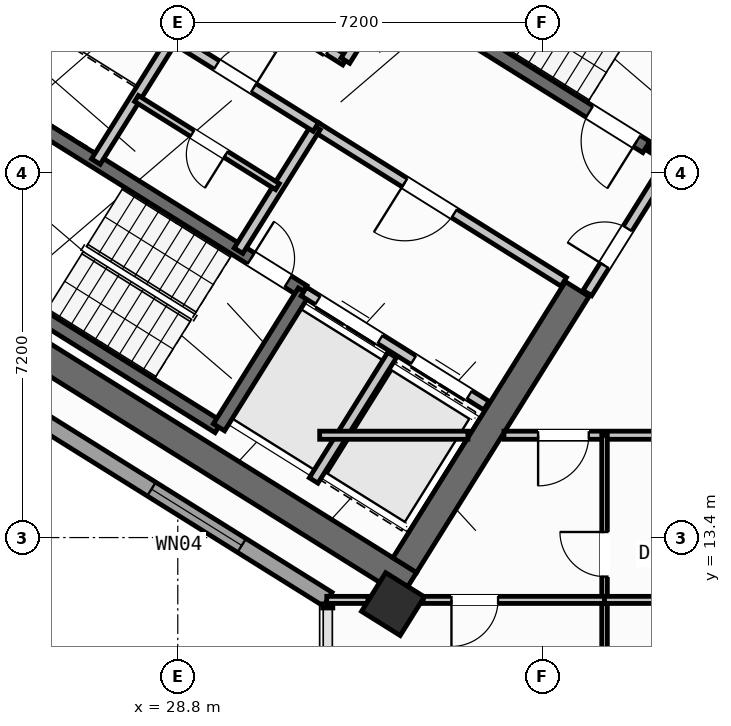
"""IFC4 building model, lengths in metres.
Left out: names, types, materials, properties, quantities, classifications, styles, units other than length and angle.
Written with IfcOpenShell. Run it as: python <this file> out.ifc"""

import sys

from ifc_helpers import new_model, si_unit, direction, frame, frame_2d, origin, origin_2d, place, context, subcontext, project, spatial, rectangle, hollow_rectangle, extrude, source, transform, mapped, element, fill, save


model = new_model("IFC4")
c1 = context("Model", 3, precision=1e-05, world=origin(), true_north=direction((0.0, 1.0)))
c2 = subcontext(c1, "Body", "Model", "MODEL_VIEW")
j1 = project(units=[si_unit("LENGTHUNIT", "METRE"), si_unit("PLANEANGLEUNIT", "RADIAN")], contexts=[c1])
p1 = place(None, origin())
s1 = spatial("IfcSite", under=j1, at=p1, CompositionType="ELEMENT")
p2 = place(p1, origin())
s2 = spatial("IfcBuilding", under=s1, at=p2, CompositionType="ELEMENT")
p3 = place(p2, frame((0.0, 0.0, 105.3)))
s3 = spatial("IfcBuildingStorey", under=s2, at=p3, CompositionType="ELEMENT", Elevation=105.3)
p4 = place(p3, frame((33.366, 12.477, 0.0), z_axis=(0.0, 0.0, 1.0), x_axis=(-0.848047359947, 0.529920442413, 0.0)))
e1 = element("IfcWall", 1, at=p4, inside=s3, PredefinedType="SHEAR", context=c2, shape_type="SweptSolid", body=[
    extrude(rectangle(XDim=13.14, YDim=0.55, at=frame_2d((6.57, 0.0))), origin(), (0.0, 0.0, 1.0), 3.35),
])
p5 = place(p3, frame((40.194, 23.922, 0.0), z_axis=(0.0, 0.0, 1.0), x_axis=(-0.529888438328, -0.848067357541, 0.0)))
e2 = element("IfcWall", 2, at=p5, inside=s3, PredefinedType="SHEAR", context=c2, shape_type="SweptSolid", body=[
    extrude(rectangle(XDim=3.575, YDim=0.55, at=frame_2d((1.788, 0.0))), origin(), (0.0, 0.0, 1.0), 3.35),
])
p6 = place(p3, frame((36.683, 18.304, 0.0), z_axis=(0.0, 0.0, 1.0), x_axis=(-0.529896466841, -0.848062341122, 0.0)))
e3 = element("IfcWall", 3, at=p6, inside=s3, PredefinedType="SHEAR", context=c2, shape_type="SweptSolid", body=[
    extrude(rectangle(XDim=6.425, YDim=0.55, at=frame_2d((3.212, 0.0))), origin(), (0.0, 0.0, 1.0), 3.35),
])
m1 = source(origin(), c2, "Body", "SweptSolid", [
    extrude(hollow_rectangle(XDim=0.9, YDim=0.9, WallThickness=0.036, at=origin_2d()), origin(), (0.0, 0.0, 1.0), 3.6),
])
p7 = place(p3, frame((33.046, 12.087, 0.0), z_axis=(0.0, 0.0, 1.0), x_axis=(-0.848048096156, 0.529919264233, 0.0)))
e4 = element("IfcColumn", 4, at=p7, inside=s3, PredefinedType="COLUMN", context=c2, shape_type="MappedRepresentation", body=[
    mapped(m1, transform((0.0, 0.0, 0.0), scale=1.0)),
])
p8 = place(p3, frame((31.76, 12.183, 0.0), z_axis=(0.0, 0.0, 1.0), x_axis=(-0.848047074256, 0.529920899612, 0.0)))
e5 = element("IfcWall", 5, at=p8, inside=s3, PredefinedType="STANDARD", context=c2, shape_type="SweptSolid", body=[
    extrude(rectangle(XDim=30.652, YDim=0.32, at=frame_2d((15.326, 0.0))), origin(), (0.0, 0.0, 1.0), 3.35),
])
p9 = place(p8, frame((15.153, 0.0, 0.0)))
e6 = element("IfcOpeningElement", 6, at=p9, cuts=e5, PredefinedType="OPENING", context=c2, shape_type="SweptSolid", body=[
    extrude(rectangle(XDim=1.2, YDim=2.15, at=frame_2d((0.6, 1.075))), frame((0.0, 0.17, 0.0), z_axis=(0.0, -1.0, 0.0), x_axis=(1.0, 0.0, 0.0)), (0.0, 0.0, 1.0), 0.34),
])
p10 = place(p8, frame((2.002, 0.0, 0.8)))
e7 = element("IfcOpeningElement", 7, at=p10, cuts=e5, PredefinedType="OPENING", context=c2, shape_type="SweptSolid", body=[
    extrude(rectangle(XDim=2.1, YDim=1.55, at=frame_2d((1.05, 0.775))), frame((0.0, 0.17, 0.0), z_axis=(0.0, -1.0, 0.0), x_axis=(1.0, 0.0, 0.0)), (0.0, 0.0, 1.0), 0.34),
])
p11 = place(p8, frame((7.206, 0.0, 0.8)))
e8 = element("IfcOpeningElement", 8, at=p11, cuts=e5, PredefinedType="OPENING", context=c2, shape_type="SweptSolid", body=[
    extrude(rectangle(XDim=2.1, YDim=1.55, at=frame_2d((1.05, 0.775))), frame((0.0, 0.17, 0.0), z_axis=(0.0, -1.0, 0.0), x_axis=(1.0, 0.0, 0.0)), (0.0, 0.0, 1.0), 0.34),
])
p12 = place(p8, frame((12.648, 0.0, 1.0)))
e9 = element("IfcOpeningElement", 9, at=p12, cuts=e5, PredefinedType="OPENING", context=c2, shape_type="SweptSolid", body=[
    extrude(rectangle(XDim=0.9, YDim=1.25, at=frame_2d((0.45, 0.625))), frame((0.0, 0.17, 0.0), z_axis=(0.0, -1.0, 0.0), x_axis=(1.0, 0.0, 0.0)), (0.0, 0.0, 1.0), 0.34),
])
p13 = place(p8, frame((20.628, 0.0, 0.95)))
e10 = element("IfcOpeningElement", 10, at=p13, cuts=e5, PredefinedType="OPENING", context=c2, shape_type="SweptSolid", body=[
    extrude(rectangle(XDim=1.2, YDim=1.4, at=frame_2d((0.6, 0.7))), frame((0.0, 0.17, 0.0), z_axis=(0.0, -1.0, 0.0), x_axis=(1.0, 0.0, 0.0)), (0.0, 0.0, 1.0), 0.34),
])
p14 = place(p8, frame((26.008, 0.0, 1.0)))
e11 = element("IfcOpeningElement", 11, at=p14, cuts=e5, PredefinedType="OPENING", context=c2, shape_type="SweptSolid", body=[
    extrude(rectangle(XDim=0.9, YDim=1.25, at=frame_2d((0.45, 0.625))), frame((0.0, 0.17, 0.0), z_axis=(0.0, -1.0, 0.0), x_axis=(1.0, 0.0, 0.0)), (0.0, 0.0, 1.0), 0.34),
])
p15 = place(p8, frame((28.408, 0.0, 1.0)))
e12 = element("IfcOpeningElement", 12, at=p15, cuts=e5, PredefinedType="OPENING", context=c2, shape_type="SweptSolid", body=[
    extrude(rectangle(XDim=0.9, YDim=1.25, at=frame_2d((0.45, 0.625))), frame((0.0, 0.17, 0.0), z_axis=(0.0, -1.0, 0.0), x_axis=(1.0, 0.0, 0.0)), (0.0, 0.0, 1.0), 0.34),
])
p16 = place(p3, frame((29.605, 15.581, 0.0), z_axis=(0.0, 0.0, 1.0), x_axis=(-0.848036911448, 0.529937163087, 0.0)))
e13 = element("IfcWall", 13, at=p16, inside=s3, PredefinedType="SHEAR", context=c2, shape_type="SweptSolid", body=[
    extrude(rectangle(XDim=7.46, YDim=0.26, at=frame_2d((3.73, 0.0))), origin(), (0.0, 0.0, 1.0), 3.35),
])
p17 = place(p3, frame((31.28, 18.261, 0.0), z_axis=(0.0, 0.0, 1.0), x_axis=(-0.848051618787, 0.529913626805, 0.0)))
e14 = element("IfcWall", 14, at=p17, inside=s3, PredefinedType="SHEAR", context=c2, shape_type="SweptSolid", body=[
    extrude(rectangle(XDim=7.46, YDim=0.26, at=frame_2d((3.73, 0.0))), origin(), (0.0, 0.0, 1.0), 3.35),
])
p18 = place(p17, frame((0.36, 0.0, 0.0)))
e15 = element("IfcOpeningElement", 15, at=p18, cuts=e14, PredefinedType="OPENING", context=c2, shape_type="SweptSolid", body=[
    extrude(rectangle(XDim=0.86, YDim=2.05, at=frame_2d((0.43, 1.025))), frame((0.0, 0.14, 0.0), z_axis=(0.0, -1.0, 0.0), x_axis=(1.0, 0.0, 0.0)), (0.0, 0.0, 1.0), 0.28),
])
p19 = place(p3, frame((31.288, 18.256, 0.0), z_axis=(0.0, 0.0, 1.0), x_axis=(-0.529943379326, -0.848033026897, 0.0)))
e16 = element("IfcWall", 16, at=p19, inside=s3, PredefinedType="SHEAR", context=c2, shape_type="SweptSolid", body=[
    extrude(rectangle(XDim=3.16, YDim=0.26, at=frame_2d((1.58, 0.0))), origin(), (0.0, 0.0, 1.0), 3.35),
])
p20 = place(p3, frame((38.046, 21.108, 0.0), z_axis=(0.0, 0.0, 1.0), x_axis=(-0.848054434086, 0.529909121291, 0.0)))
e17 = element("IfcWall", 17, at=p20, inside=s3, PredefinedType="SHEAR", context=c2, shape_type="SweptSolid", body=[
    extrude(rectangle(XDim=7.33, YDim=0.26, at=frame_2d((3.665, 0.0))), origin(), (0.0, 0.0, 1.0), 3.35),
])
p21 = place(p20, frame((0.22, 0.0, 0.0)))
e18 = element("IfcOpeningElement", 18, at=p21, cuts=e17, PredefinedType="OPENING", context=c2, shape_type="SweptSolid", body=[
    extrude(rectangle(XDim=1.1, YDim=2.1, at=frame_2d((0.55, 1.05))), frame((0.0, 0.14, 0.0), z_axis=(0.0, -1.0, 0.0), x_axis=(1.0, 0.0, 0.0)), (0.0, 0.0, 1.0), 0.28),
])
p22 = place(p3, frame((34.891, 16.005, 0.0), z_axis=(0.0, 0.0, 1.0), x_axis=(-0.848062873452, 0.529895614884, 0.0)))
e19 = element("IfcWall", 19, at=p22, inside=s3, PredefinedType="STANDARD", context=c2, shape_type="SweptSolid", body=[
    extrude(rectangle(XDim=4.248, YDim=0.2, at=frame_2d((2.124, 0.0))), origin(), (0.0, 0.0, 1.0), 3.34),
])
p23 = place(p22, frame((0.398, 0.0, 0.0)))
e20 = element("IfcOpeningElement", 20, at=p23, cuts=e19, PredefinedType="OPENING", context=c2, shape_type="SweptSolid", body=[
    extrude(rectangle(XDim=1.3, YDim=2.2, at=frame_2d((0.65, 1.1))), frame((0.0, 0.11, 0.0), z_axis=(0.0, -1.0, 0.0), x_axis=(1.0, 0.0, 0.0)), (0.0, 0.0, 1.0), 0.22),
])
p24 = place(p22, frame((2.473, 0.0, 0.0)))
e21 = element("IfcOpeningElement", 21, at=p24, cuts=e19, PredefinedType="OPENING", context=c2, shape_type="SweptSolid", body=[
    extrude(rectangle(XDim=1.45, YDim=2.25, at=frame_2d((0.725, 1.125))), frame((0.0, 0.11, 0.0), z_axis=(0.0, -1.0, 0.0), x_axis=(1.0, 0.0, 0.0)), (0.0, 0.0, 1.0), 0.22),
])
p25 = place(p3, frame((36.417, 18.447, 0.0), z_axis=(0.0, 0.0, 1.0), x_axis=(-0.848064879198, 0.529892404805, 0.0)))
e22 = element("IfcWall", 22, at=p25, inside=s3, PredefinedType="STANDARD", context=c2, shape_type="SweptSolid", body=[
    extrude(rectangle(XDim=5.768, YDim=0.2, at=frame_2d((2.884, 0.0))), origin(), (0.0, 0.0, 1.0), 3.34),
])
p26 = place(p25, frame((2.548, 0.0, 0.0)))
e23 = element("IfcOpeningElement", 23, at=p26, cuts=e22, PredefinedType="OPENING", context=c2, shape_type="SweptSolid", body=[
    extrude(rectangle(XDim=1.15, YDim=2.1, at=frame_2d((0.575, 1.05))), frame((0.0, 0.11, 0.0), z_axis=(0.0, -1.0, 0.0), x_axis=(1.0, 0.0, 0.0)), (0.0, 0.0, 1.0), 0.22),
])
p27 = place(p3, frame((32.108, 22.814, 0.0), z_axis=(0.0, 0.0, 1.0), x_axis=(-0.848042229521, 0.529928652696, 0.0)))
e24 = element("IfcWall", 24, at=p27, inside=s3, PredefinedType="STANDARD", context=c2, shape_type="SweptSolid", body=[
    extrude(rectangle(XDim=5.62, YDim=0.2, at=frame_2d((2.81, 0.0))), origin(), (0.0, 0.0, 1.0), 3.34),
])
p28 = place(p27, frame((0.39, 0.0, 0.0)))
e25 = element("IfcOpeningElement", 25, at=p28, cuts=e24, PredefinedType="OPENING", context=c2, shape_type="SweptSolid", body=[
    extrude(rectangle(XDim=1.1, YDim=2.15, at=frame_2d((0.55, 1.075))), frame((0.0, 0.11, 0.0), z_axis=(0.0, -1.0, 0.0), x_axis=(1.0, 0.0, 0.0)), (0.0, 0.0, 1.0), 0.22),
])
p29 = place(p27, frame((2.25, 0.0, 0.0)))
e26 = element("IfcOpeningElement", 26, at=p29, cuts=e24, PredefinedType="OPENING", context=c2, shape_type="SweptSolid", body=[
    extrude(rectangle(XDim=1.1, YDim=2.15, at=frame_2d((0.55, 1.075))), frame((0.0, 0.11, 0.0), z_axis=(0.0, -1.0, 0.0), x_axis=(1.0, 0.0, 0.0)), (0.0, 0.0, 1.0), 0.22),
])
p30 = place(p27, frame((4.11, 0.0, 0.0)))
e27 = element("IfcOpeningElement", 27, at=p30, cuts=e24, PredefinedType="OPENING", context=c2, shape_type="SweptSolid", body=[
    extrude(rectangle(XDim=1.1, YDim=2.15, at=frame_2d((0.55, 1.075))), frame((0.0, 0.11, 0.0), z_axis=(0.0, -1.0, 0.0), x_axis=(1.0, 0.0, 0.0)), (0.0, 0.0, 1.0), 0.22),
])
p31 = place(p3, frame((32.982, 24.213, 0.0), z_axis=(0.0, 0.0, 1.0), x_axis=(-0.529839334948, -0.84809803628, 0.0)))
e28 = element("IfcWall", 28, at=p31, inside=s3, PredefinedType="STANDARD", context=c2, shape_type="SweptSolid", body=[
    extrude(rectangle(XDim=1.65, YDim=0.2, at=frame_2d((0.825, 0.0))), origin(), (0.0, 0.0, 1.0), 3.34),
])
p32 = place(p3, frame((33.029, 17.003, 0.0), z_axis=(0.0, 0.0, 1.0), x_axis=(-0.529916267533, -0.848049968695, 0.0)))
e29 = element("IfcWall", 29, at=p32, inside=s3, PredefinedType="STANDARD", context=c2, shape_type="SweptSolid", body=[
    extrude(rectangle(XDim=2.92, YDim=0.2, at=frame_2d((1.46, 0.0))), origin(), (0.0, 0.0, 1.0), 3.34),
])
for number, where, z_axis, x_axis in (
    (30, (31.525, 21.504, 0.0), (0.0, 0.0, 1.0), (-0.53, -0.848, 0.0)),
    (31, (28.71, 23.263, 0.0), (0.0, 0.0, 1.0), (-0.53, -0.848, 0.0)),
):
    element("IfcWall", number, at=place(p3, frame(where, z_axis=z_axis, x_axis=x_axis)), inside=s3, PredefinedType="STANDARD", context=c2, shape_type="SweptSolid", body=[
        extrude(rectangle(XDim=2.88, YDim=0.2, at=frame_2d((1.44, 0.0))), origin(), (0.0, 0.0, 1.0), 3.34),
    ])
p33 = place(p3, frame((31.525, 21.504, 0.0), z_axis=(0.0, 0.0, 1.0), x_axis=(-0.848040211232, 0.529931882541, 0.0)))
e32 = element("IfcWall", 32, at=p33, inside=s3, PredefinedType="STANDARD", context=c2, shape_type="SweptSolid", body=[
    extrude(rectangle(XDim=6.218, YDim=0.2, at=frame_2d((3.109, 0.0))), origin(), (0.0, 0.0, 1.0), 3.34),
])
p34 = place(p33, frame((4.4, 0.0, 0.0)))
e33 = element("IfcOpeningElement", 33, at=p34, cuts=e32, PredefinedType="OPENING", context=c2, shape_type="SweptSolid", body=[
    extrude(rectangle(XDim=0.86, YDim=2.05, at=frame_2d((0.43, 1.025))), frame((0.0, 0.11, 0.0), z_axis=(0.0, -1.0, 0.0), x_axis=(1.0, 0.0, 0.0)), (0.0, 0.0, 1.0), 0.22),
])
p35 = place(p33, frame((1.45, 0.0, 0.0)))
e34 = element("IfcOpeningElement", 34, at=p35, cuts=e32, PredefinedType="OPENING", context=c2, shape_type="SweptSolid", body=[
    extrude(rectangle(XDim=0.86, YDim=2.05, at=frame_2d((0.43, 1.025))), frame((0.0, 0.11, 0.0), z_axis=(0.0, -1.0, 0.0), x_axis=(1.0, 0.0, 0.0)), (0.0, 0.0, 1.0), 0.22),
])
p36 = place(p3, frame((30.766, 20.327, 0.0), z_axis=(0.0, 0.0, 1.0), x_axis=(-0.848052663127, 0.529911955482, 0.0)))
e35 = element("IfcWall", 35, at=p36, inside=s3, PredefinedType="PLUMBINGWALL", context=c2, shape_type="SweptSolid", body=[
    extrude(rectangle(XDim=3.28, YDim=0.14, at=frame_2d((1.64, 0.0))), origin(), (0.0, 0.0, 1.0), 3.34),
])
p37 = place(p36, frame((1.2, 0.0, 0.0)))
e36 = element("IfcOpeningElement", 36, at=p37, cuts=e35, PredefinedType="OPENING", context=c2, shape_type="SweptSolid", body=[
    extrude(rectangle(XDim=0.78, YDim=2.05, at=frame_2d((0.39, 1.025))), frame((0.0, 0.08, 0.0), z_axis=(0.0, -1.0, 0.0), x_axis=(1.0, 0.0, 0.0)), (0.0, 0.0, 1.0), 0.16),
])
p38 = place(p3, frame((38.451, 20.737, 0.0), z_axis=(0.0, 0.0, 1.0), x_axis=(-0.529924799939, -0.848044637038, 0.0)))
e37 = element("IfcWall", 37, at=p38, inside=s3, PredefinedType="STANDARD", context=c2, shape_type="SweptSolid", body=[
    extrude(rectangle(XDim=2.96, YDim=0.2, at=frame_2d((1.48, 0.0))), origin(), (0.0, 0.0, 1.0), 3.34),
])
p39 = place(p38, frame((1.46, 0.0, 0.0)))
e38 = element("IfcOpeningElement", 38, at=p39, cuts=e37, PredefinedType="OPENING", context=c2, shape_type="SweptSolid", body=[
    extrude(rectangle(XDim=0.86, YDim=2.05, at=frame_2d((0.43, 1.025))), frame((0.0, 0.11, 0.0), z_axis=(0.0, -1.0, 0.0), x_axis=(1.0, 0.0, 0.0)), (0.0, 0.0, 1.0), 0.22),
])
p40 = place(p3, frame((31.6, 15.42, 0.0), z_axis=(0.0, 0.0, 1.0), x_axis=(1.0, 0.0, 0.0)))
e39 = element("IfcWall", 39, at=p40, inside=s3, PredefinedType="PARTITIONING", context=c2, shape_type="SweptSolid", body=[
    extrude(rectangle(XDim=2.925, YDim=0.16, at=frame_2d((1.462, 0.0))), origin(), (0.0, 0.0, 1.0), 3.34),
])
p41 = place(p3, frame((35.237, 15.42, 0.0), z_axis=(0.0, 0.0, 1.0), x_axis=(1.0, 0.0, 0.0)))
e40 = element("IfcWall", 40, at=p41, inside=s3, PredefinedType="PARTITIONING", context=c2, shape_type="SweptSolid", body=[
    extrude(rectangle(XDim=15.432, YDim=0.16, at=frame_2d((7.716, 0.0))), origin(), (0.0, 0.0, 1.0), 3.34),
])
p42 = place(p41, frame((0.674, 0.0, 0.0)))
e41 = element("IfcOpeningElement", 41, at=p42, cuts=e40, PredefinedType="OPENING", context=c2, shape_type="SweptSolid", body=[
    extrude(rectangle(XDim=1.0, YDim=2.1, at=frame_2d((0.5, 1.05))), frame((0.0, 0.09, 0.0), z_axis=(0.0, -1.0, 0.0), x_axis=(1.0, 0.0, 0.0)), (0.0, 0.0, 1.0), 0.18),
])
p43 = place(p41, frame((9.094, 0.0, 0.0)))
e42 = element("IfcOpeningElement", 42, at=p43, cuts=e40, PredefinedType="OPENING", context=c2, shape_type="SweptSolid", body=[
    extrude(rectangle(XDim=1.0, YDim=2.1, at=frame_2d((0.5, 1.05))), frame((0.0, 0.09, 0.0), z_axis=(0.0, -1.0, 0.0), x_axis=(1.0, 0.0, 0.0)), (0.0, 0.0, 1.0), 0.18),
])
p44 = place(p3, frame((37.222, 1.96, 0.0), z_axis=(0.0, 0.0, 1.0), x_axis=(0.0, 1.0, 0.0)))
e43 = element("IfcWall", 43, at=p44, inside=s3, PredefinedType="PARTITIONING", context=c2, shape_type="SweptSolid", body=[
    extrude(rectangle(XDim=13.46, YDim=0.11, at=frame_2d((6.73, 0.0))), origin(), (0.0, 0.0, 1.0), 3.34),
])
p45 = place(p44, frame((5.2, 0.0, 0.0)))
e44 = element("IfcOpeningElement", 44, at=p45, cuts=e43, PredefinedType="OPENING", context=c2, shape_type="SweptSolid", body=[
    extrude(rectangle(XDim=0.92, YDim=2.08, at=frame_2d((0.46, 1.04))), frame((0.0, 0.065, 0.0), z_axis=(0.0, -1.0, 0.0), x_axis=(1.0, 0.0, 0.0)), (0.0, 0.0, 1.0), 0.13),
])
p46 = place(p44, frame((10.67, 0.0, 0.0)))
e45 = element("IfcOpeningElement", 45, at=p46, cuts=e43, PredefinedType="OPENING", context=c2, shape_type="SweptSolid", body=[
    extrude(rectangle(XDim=0.88, YDim=2.08, at=frame_2d((0.44, 1.04))), frame((0.0, 0.065, 0.0), z_axis=(0.0, -1.0, 0.0), x_axis=(1.0, 0.0, 0.0)), (0.0, 0.0, 1.0), 0.13),
])
p47 = place(p3, frame((31.74, 12.17, 0.0), z_axis=(0.0, 0.0, 1.0), x_axis=(1.0, 0.0, 0.0)))
e46 = element("IfcWall", 46, at=p47, inside=s3, PredefinedType="PLUMBINGWALL", context=c2, shape_type="SweptSolid", body=[
    extrude(rectangle(XDim=0.813, YDim=0.14, at=frame_2d((0.407, 0.0))), origin(), (0.0, 0.0, 1.0), 3.34),
])
p48 = place(p3, frame((33.643, 12.17, 0.0), z_axis=(0.0, 0.0, 1.0), x_axis=(1.0, 0.0, 0.0)))
e47 = element("IfcWall", 47, at=p48, inside=s3, PredefinedType="PLUMBINGWALL", context=c2, shape_type="SweptSolid", body=[
    extrude(rectangle(XDim=3.579, YDim=0.14, at=frame_2d((1.79, 0.0))), origin(), (0.0, 0.0, 1.0), 2.525),
])
p49 = place(p48, frame((0.558, 0.0, 0.0)))
e48 = element("IfcOpeningElement", 48, at=p49, cuts=e47, PredefinedType="OPENING", context=c2, shape_type="SweptSolid", body=[
    extrude(rectangle(XDim=0.92, YDim=2.08, at=frame_2d((0.46, 1.04))), frame((0.0, 0.08, 0.0), z_axis=(0.0, -1.0, 0.0), x_axis=(1.0, 0.0, 0.0)), (0.0, 0.0, 1.0), 0.16),
])
p50 = place(p3, frame((37.222, 12.17, 0.0), z_axis=(0.0, 0.0, 1.0), x_axis=(1.0, 0.0, 0.0)))
e49 = element("IfcWall", 49, at=p50, inside=s3, PredefinedType="PLUMBINGWALL", context=c2, shape_type="SweptSolid", body=[
    extrude(rectangle(XDim=4.728, YDim=0.14, at=frame_2d((2.364, 0.0))), origin(), (0.0, 0.0, 1.0), 2.525),
])
m2 = source(origin(), c2, "Body", "SweptSolid", [
    extrude(rectangle(XDim=2.1, YDim=1.55, at=frame_2d((1.05, 0.775))), frame((0.0, 0.03, 0.0), z_axis=(0.0, -1.0, 0.0), x_axis=(1.0, 0.0, 0.0)), (0.0, 0.0, 1.0), 0.06),
])
p51 = place(p10, origin())
e50 = element("IfcWindow", 50, at=p51, inside=s3, PartitioningType="SINGLE_PANEL", PredefinedType="WINDOW", context=c2, shape_type="MappedRepresentation", body=[
    mapped(m2, transform((0.0, 0.0, 0.0), scale=1.0)),
])
fill(e7, e50)
m3 = source(origin(), c2, "Body", "SweptSolid", [
    extrude(rectangle(XDim=0.86, YDim=2.05, at=frame_2d((0.43, 1.025))), frame((0.0, 0.025, 0.0), z_axis=(0.0, -1.0, 0.0), x_axis=(1.0, 0.0, 0.0)), (0.0, 0.0, 1.0), 0.05),
])
p52 = place(p18, frame((0.86, 0.0, 0.0), z_axis=(0.0, 0.0, 1.0), x_axis=(-1.0, 0.0, 0.0)))
e51 = element("IfcDoor", 51, at=p52, inside=s3, OperationType="SINGLE_SWING_LEFT", PredefinedType="DOOR", context=c2, shape_type="MappedRepresentation", body=[
    mapped(m3, transform((0.0, 0.0, 0.0), scale=1.0)),
])
fill(e15, e51)
m4 = source(origin(), c2, "Body", "SweptSolid", [
    extrude(rectangle(XDim=1.1, YDim=2.1, at=frame_2d((0.55, 1.05))), frame((0.0, 0.025, 0.0), z_axis=(0.0, -1.0, 0.0), x_axis=(1.0, 0.0, 0.0)), (0.0, 0.0, 1.0), 0.05),
])
p53 = place(p21, origin())
e52 = element("IfcDoor", 52, at=p53, inside=s3, OperationType="SINGLE_SWING_LEFT", PredefinedType="DOOR", context=c2, shape_type="MappedRepresentation", body=[
    mapped(m4, transform((0.0, 0.0, 0.0), scale=1.0)),
])
fill(e18, e52)
m5 = source(origin(), c2, "Body", "SweptSolid", [
    extrude(rectangle(XDim=1.15, YDim=2.1, at=frame_2d((0.575, 1.05))), frame((0.0, 0.025, 0.0), z_axis=(0.0, -1.0, 0.0), x_axis=(1.0, 0.0, 0.0)), (0.0, 0.0, 1.0), 0.05),
])
p54 = place(p26, origin())
e53 = element("IfcDoor", 53, at=p54, inside=s3, OperationType="SINGLE_SWING_RIGHT", PredefinedType="DOOR", context=c2, shape_type="MappedRepresentation", body=[
    mapped(m5, transform((0.0, 0.0, 0.0), scale=1.0)),
])
fill(e23, e53)
m6 = source(origin(), c2, "Body", "SweptSolid", [
    extrude(rectangle(XDim=1.3, YDim=2.2, at=frame_2d((0.65, 1.1))), frame((0.0, 0.025, 0.0), z_axis=(0.0, -1.0, 0.0), x_axis=(1.0, 0.0, 0.0)), (0.0, 0.0, 1.0), 0.05),
])
p55 = place(p23, origin())
e54 = element("IfcDoor", 54, at=p55, inside=s3, OperationType="DOUBLE_DOOR_SLIDING", PredefinedType="DOOR", context=c2, shape_type="MappedRepresentation", body=[
    mapped(m6, transform((0.0, 0.0, 0.0), scale=1.0)),
])
fill(e20, e54)
m7 = source(origin(), c2, "Body", "SweptSolid", [
    extrude(rectangle(XDim=1.45, YDim=2.25, at=frame_2d((0.725, 1.125))), frame((0.0, 0.025, 0.0), z_axis=(0.0, -1.0, 0.0), x_axis=(1.0, 0.0, 0.0)), (0.0, 0.0, 1.0), 0.05),
])
p56 = place(p24, origin())
e55 = element("IfcDoor", 55, at=p56, inside=s3, OperationType="DOUBLE_DOOR_SLIDING", PredefinedType="DOOR", context=c2, shape_type="MappedRepresentation", body=[
    mapped(m7, transform((0.0, 0.0, 0.0), scale=1.0)),
])
fill(e21, e55)
p57 = place(p35, frame((0.86, 0.0, 0.0), z_axis=(0.0, 0.0, 1.0), x_axis=(-1.0, 0.0, 0.0)))
e56 = element("IfcDoor", 56, at=p57, inside=s3, OperationType="SINGLE_SWING_RIGHT", PredefinedType="DOOR", context=c2, shape_type="MappedRepresentation", body=[
    mapped(m3, transform((0.0, 0.0, 0.0), scale=1.0)),
])
fill(e34, e56)
m8 = source(origin(), c2, "Body", "SweptSolid", [
    extrude(rectangle(XDim=0.78, YDim=2.05, at=frame_2d((0.39, 1.025))), frame((0.0, 0.025, 0.0), z_axis=(0.0, -1.0, 0.0), x_axis=(1.0, 0.0, 0.0)), (0.0, 0.0, 1.0), 0.05),
])
p58 = place(p37, origin())
e57 = element("IfcDoor", 57, at=p58, inside=s3, OperationType="SINGLE_SWING_LEFT", PredefinedType="DOOR", context=c2, shape_type="MappedRepresentation", body=[
    mapped(m8, transform((0.0, 0.0, 0.0), scale=1.0)),
])
fill(e36, e57)
p59 = place(p39, frame((0.86, 0.0, 0.0), z_axis=(0.0, 0.0, 1.0), x_axis=(-1.0, 0.0, 0.0)))
e58 = element("IfcDoor", 58, at=p59, inside=s3, OperationType="SINGLE_SWING_LEFT", PredefinedType="DOOR", context=c2, shape_type="MappedRepresentation", body=[
    mapped(m3, transform((0.0, 0.0, 0.0), scale=1.0)),
])
fill(e38, e58)
m9 = source(origin(), c2, "Body", "SweptSolid", [
    extrude(rectangle(XDim=1.0, YDim=2.1, at=frame_2d((0.5, 1.05))), frame((0.0, 0.025, 0.0), z_axis=(0.0, -1.0, 0.0), x_axis=(1.0, 0.0, 0.0)), (0.0, 0.0, 1.0), 0.05),
])
p60 = place(p42, frame((1.0, 0.0, 0.0), z_axis=(0.0, 0.0, 1.0), x_axis=(-1.0, 0.0, 0.0)))
e59 = element("IfcDoor", 59, at=p60, inside=s3, OperationType="SINGLE_SWING_RIGHT", PredefinedType="DOOR", context=c2, shape_type="MappedRepresentation", body=[
    mapped(m9, transform((0.0, 0.0, 0.0), scale=1.0)),
])
fill(e41, e59)
m10 = source(origin(), c2, "Body", "SweptSolid", [
    extrude(rectangle(XDim=0.92, YDim=2.08, at=frame_2d((0.46, 1.04))), frame((0.0, 0.025, 0.0), z_axis=(0.0, -1.0, 0.0), x_axis=(1.0, 0.0, 0.0)), (0.0, 0.0, 1.0), 0.05),
])
p61 = place(p49, frame((0.92, 0.0, 0.0), z_axis=(0.0, 0.0, 1.0), x_axis=(-1.0, 0.0, 0.0)))
e60 = element("IfcDoor", 60, at=p61, inside=s3, OperationType="SINGLE_SWING_RIGHT", PredefinedType="DOOR", context=c2, shape_type="MappedRepresentation", body=[
    mapped(m10, transform((0.0, 0.0, 0.0), scale=1.0)),
])
fill(e48, e60)
m11 = source(origin(), c2, "Body", "SweptSolid", [
    extrude(rectangle(XDim=0.88, YDim=2.08, at=frame_2d((0.44, 1.04))), frame((0.0, 0.025, 0.0), z_axis=(0.0, -1.0, 0.0), x_axis=(1.0, 0.0, 0.0)), (0.0, 0.0, 1.0), 0.05),
])
p62 = place(p46, origin())
e61 = element("IfcDoor", 61, at=p62, inside=s3, OperationType="SINGLE_SWING_RIGHT", PredefinedType="DOOR", context=c2, shape_type="MappedRepresentation", body=[
    mapped(m11, transform((0.0, 0.0, 0.0), scale=1.0)),
])
fill(e45, e61)
save(model, sys.argv[1])
